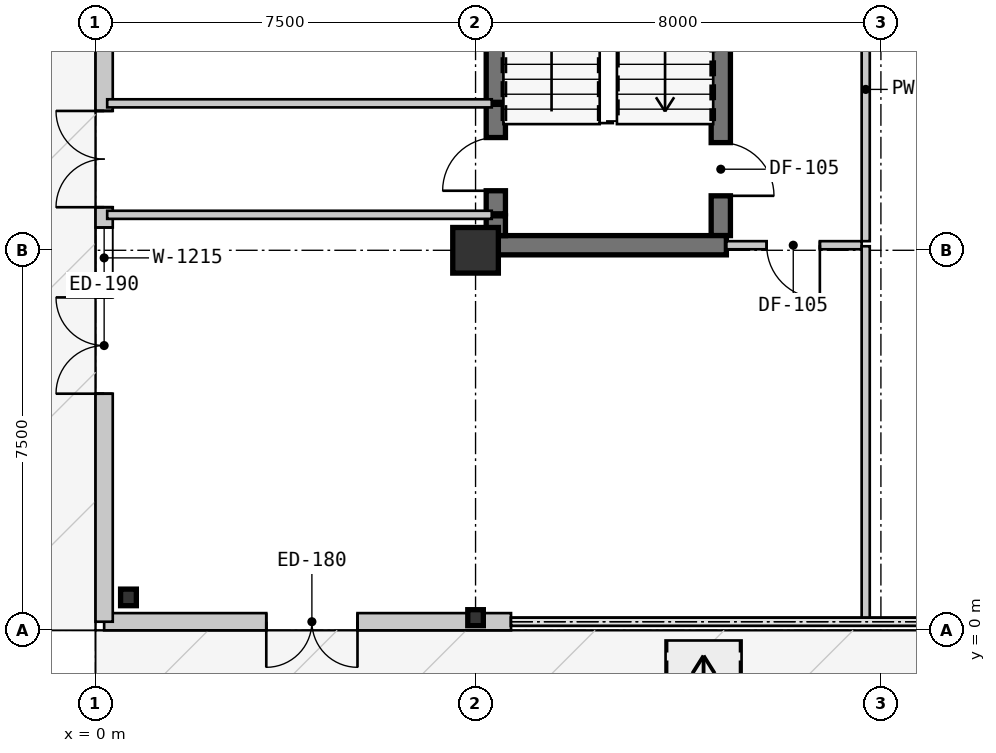
"""IFC4 building model, lengths in metres.
Left out: names, types, materials, properties, quantities, classifications, styles, units other than length and angle.
Written with IfcOpenShell. Run it as: python <this file> out.ifc"""

import sys

from ifc_helpers import new_model, si_unit, direction, frame, frame_2d, origin, origin_2d, place, context, subcontext, project, spatial, rectangle, circle, i_section, extrude, source, transform, mapped, element, fill, save


model = new_model("IFC4")
c1 = context("Model", 3, precision=1e-05, world=origin(), true_north=direction((0.0, 1.0)))
c2 = subcontext(c1, "Body", "Model", "MODEL_VIEW")
j1 = project(units=[si_unit("LENGTHUNIT", "METRE"), si_unit("PLANEANGLEUNIT", "RADIAN")], contexts=[c1])
p1 = place(None, origin())
s1 = spatial("IfcSite", under=j1, at=p1, CompositionType="ELEMENT")
p2 = place(p1, origin())
s2 = spatial("IfcBuilding", under=s1, at=p2, CompositionType="ELEMENT")
p3 = place(p2, origin())
s3 = spatial("IfcBuildingStorey", under=s2, at=p3, CompositionType="ELEMENT", Elevation=0.0)
m1 = source(origin(), c2, "Body", "SweptSolid", [
    extrude(circle(Radius=0.45, at=origin_2d()), origin(), (0.0, 0.0, 1.0), 4.55),
])
p4 = place(p3, frame((7.5, 7.5, 0.0), z_axis=(0.0, 0.0, 1.0), x_axis=(1.0, 0.0, 0.0)))
e1 = element("IfcColumn", 1, at=p4, inside=s3, PredefinedType="COLUMN", context=c2, shape_type="MappedRepresentation", body=[
    mapped(m1, transform((0.0, 0.0, 0.0), scale=1.0)),
])
m2 = source(origin(), c2, "Body", "SweptSolid", [
    extrude(i_section(OverallWidth=0.311, OverallDepth=0.327, WebThickness=0.016, FlangeThickness=0.025, at=origin_2d()), origin(), (0.0, 0.0, 1.0), 4.55),
])
p5 = place(p3, frame((0.65, 0.65, 0.0), z_axis=(0.0, 0.0, 1.0), x_axis=(1.0, 0.0, 0.0)))
e2 = element("IfcColumn", 2, at=p5, inside=s3, PredefinedType="COLUMN", context=c2, shape_type="MappedRepresentation", body=[
    mapped(m2, transform((0.0, 0.0, 0.0), scale=1.0)),
])
m3 = source(origin(), c2, "Body", "SweptSolid", [
    extrude(i_section(OverallWidth=0.307, OverallDepth=0.315, WebThickness=0.012, FlangeThickness=0.019, at=origin_2d()), origin(), (0.0, 0.0, 1.0), 4.55),
])
p6 = place(p3, frame((7.5, 0.25, 0.0), z_axis=(0.0, 0.0, 1.0), x_axis=(1.0, 0.0, 0.0)))
e3 = element("IfcColumn", 3, at=p6, inside=s3, PredefinedType="PILASTER", context=c2, shape_type="MappedRepresentation", body=[
    mapped(m3, transform((0.0, 0.0, 0.0), scale=1.0)),
])
m4 = source(origin(), c2, "Body", "SweptSolid", [
    extrude(rectangle(XDim=8.03, YDim=0.34, at=frame_2d((4.015, 0.0))), origin(), (0.0, 0.0, 1.0), 4.29),
])
p7 = place(p3, frame((0.17, 0.17, 0.0), z_axis=(0.0, 0.0, 1.0), x_axis=(1.0, 0.0, 0.0)))
e4 = element("IfcWall", 4, at=p7, inside=s3, PredefinedType="SOLIDWALL", context=c2, shape_type="MappedRepresentation", body=[
    mapped(m4, transform((0.0, 0.0, 0.0), scale=1.0)),
])
m5 = source(origin(), c2, "Body", "SweptSolid", [
    extrude(rectangle(XDim=1.8, YDim=2.3, at=frame_2d((0.9, 1.15))), frame((0.0, 0.18, 0.0), z_axis=(0.0, -1.0, 0.0), x_axis=(1.0, 0.0, 0.0)), (0.0, 0.0, 1.0), 0.36),
])
p8 = place(p7, frame((3.2, 0.0, 0.0)))
e5 = element("IfcOpeningElement", 5, at=p8, cuts=e4, PredefinedType="OPENING", context=c2, shape_type="MappedRepresentation", body=[
    mapped(m5, transform((0.0, 0.0, 0.0), scale=1.0)),
])
m6 = source(origin(), c2, "Body", "SweptSolid", [
    extrude(rectangle(XDim=39.66, YDim=0.34, at=frame_2d((19.83, 0.0))), origin(), (0.0, 0.0, 1.0), 4.29),
])
p9 = place(p3, frame((0.17, 0.17, 0.0), z_axis=(0.0, 0.0, 1.0), x_axis=(0.0, 1.0, 0.0)))
e6 = element("IfcWall", 6, at=p9, inside=s3, PredefinedType="SOLIDWALL", context=c2, shape_type="MappedRepresentation", body=[
    mapped(m6, transform((0.0, 0.0, 0.0), scale=1.0)),
])
m7 = source(origin(), c2, "Body", "SweptSolid", [
    extrude(rectangle(XDim=1.9, YDim=2.4, at=frame_2d((0.95, 1.2))), frame((0.0, 0.18, 0.0), z_axis=(0.0, -1.0, 0.0), x_axis=(1.0, 0.0, 0.0)), (0.0, 0.0, 1.0), 0.36),
])
p10 = place(p9, frame((4.5, 0.0, 0.0)))
e7 = element("IfcOpeningElement", 7, at=p10, cuts=e6, PredefinedType="OPENING", context=c2, shape_type="MappedRepresentation", body=[
    mapped(m7, transform((0.0, 0.0, 0.0), scale=1.0)),
])
p11 = place(p9, frame((17.5, 0.0, 0.0)))
e8 = element("IfcOpeningElement", 8, at=p11, cuts=e6, PredefinedType="OPENING", context=c2, shape_type="MappedRepresentation", body=[
    mapped(m7, transform((0.0, 0.0, 0.0), scale=1.0)),
])
p12 = place(p9, frame((28.0, 0.0, 0.0)))
e9 = element("IfcOpeningElement", 9, at=p12, cuts=e6, PredefinedType="OPENING", context=c2, shape_type="MappedRepresentation", body=[
    mapped(m7, transform((0.0, 0.0, 0.0), scale=1.0)),
])
p13 = place(p9, frame((8.18, 0.0, 0.0)))
e10 = element("IfcOpeningElement", 10, at=p13, cuts=e6, PredefinedType="OPENING", context=c2, shape_type="MappedRepresentation", body=[
    mapped(m7, transform((0.0, 0.0, 0.0), scale=1.0)),
])
m8 = source(origin(), c2, "Body", "SweptSolid", [
    extrude(rectangle(XDim=1.2, YDim=1.5, at=frame_2d((0.6, 0.75))), frame((0.0, 0.18, 0.0), z_axis=(0.0, -1.0, 0.0), x_axis=(1.0, 0.0, 0.0)), (0.0, 0.0, 1.0), 0.36),
])
p14 = place(p9, frame((6.58, 0.0, 0.95)))
e11 = element("IfcOpeningElement", 11, at=p14, cuts=e6, PredefinedType="OPENING", context=c2, shape_type="MappedRepresentation", body=[
    mapped(m8, transform((0.0, 0.0, 0.0), scale=1.0)),
])
m9 = source(origin(), c2, "Body", "SweptSolid", [
    extrude(rectangle(XDim=2.1, YDim=1.6, at=frame_2d((1.05, 0.8))), frame((0.0, 0.18, 0.0), z_axis=(0.0, -1.0, 0.0), x_axis=(1.0, 0.0, 0.0)), (0.0, 0.0, 1.0), 0.36),
])
p15 = place(p9, frame((34.0, 0.0, 0.95)))
e12 = element("IfcOpeningElement", 12, at=p15, cuts=e6, PredefinedType="OPENING", context=c2, shape_type="MappedRepresentation", body=[
    mapped(m9, transform((0.0, 0.0, 0.0), scale=1.0)),
])
m10 = source(origin(), c2, "Body", "SweptSolid", [
    extrude(rectangle(XDim=8.22, YDim=0.38, at=frame_2d((4.11, 0.0))), origin(), (0.0, 0.0, 1.0), 4.29),
])
p16 = place(p3, frame((12.34, 16.01, 0.0), z_axis=(0.0, 0.0, 1.0), x_axis=(0.0, -1.0, 0.0)))
e13 = element("IfcWall", 13, at=p16, inside=s3, PredefinedType="SHEAR", context=c2, shape_type="MappedRepresentation", body=[
    mapped(m10, transform((0.0, 0.0, 0.0), scale=1.0)),
])
m11 = source(origin(), c2, "Body", "SweptSolid", [
    extrude(rectangle(XDim=1.05, YDim=2.1, at=frame_2d((0.525, 1.05))), frame((0.0, 0.2, 0.0), z_axis=(0.0, -1.0, 0.0), x_axis=(1.0, 0.0, 0.0)), (0.0, 0.0, 1.0), 0.4),
])
p17 = place(p16, frame((6.385, 0.0, 0.0)))
e14 = element("IfcOpeningElement", 14, at=p17, cuts=e13, PredefinedType="OPENING", context=c2, shape_type="MappedRepresentation", body=[
    mapped(m11, transform((0.0, 0.0, 0.0), scale=1.0)),
])
m12 = source(origin(), c2, "Body", "SweptSolid", [
    extrude(rectangle(XDim=4.66, YDim=0.38, at=frame_2d((2.33, 0.0))), origin(), (0.0, 0.0, 1.0), 4.29),
])
p18 = place(p3, frame((12.45, 7.6, 0.0), z_axis=(0.0, 0.0, 1.0), x_axis=(-1.0, 0.0, 0.0)))
e15 = element("IfcWall", 15, at=p18, inside=s3, PredefinedType="SHEAR", context=c2, shape_type="MappedRepresentation", body=[
    mapped(m12, transform((0.0, 0.0, 0.0), scale=1.0)),
])
m13 = source(origin(), c2, "Body", "SweptSolid", [
    extrude(rectangle(XDim=0.39, YDim=0.38, at=frame_2d((0.195, 0.0))), origin(), (0.0, 0.0, 1.0), 4.29),
])
p19 = place(p3, frame((7.9, 7.79, 0.0), z_axis=(0.0, 0.0, 1.0), x_axis=(0.0, 1.0, 0.0)))
e16 = element("IfcWall", 16, at=p19, inside=s3, PredefinedType="SHEAR", context=c2, shape_type="MappedRepresentation", body=[
    mapped(m13, transform((0.0, 0.0, 0.0), scale=1.0)),
])
m14 = source(origin(), c2, "Body", "SweptSolid", [
    extrude(rectangle(XDim=5.59, YDim=0.38, at=frame_2d((2.795, 0.0))), origin(), (0.0, 0.0, 1.0), 4.29),
])
p20 = place(p3, frame((7.9, 10.42, 0.0), z_axis=(0.0, 0.0, 1.0), x_axis=(0.0, 1.0, 0.0)))
e17 = element("IfcWall", 17, at=p20, inside=s3, PredefinedType="SHEAR", context=c2, shape_type="MappedRepresentation", body=[
    mapped(m14, transform((0.0, 0.0, 0.0), scale=1.0)),
])
m15 = source(origin(), c2, "Body", "SweptSolid", [
    extrude(rectangle(XDim=2.16, YDim=0.38, at=frame_2d((1.08, 0.0))), origin(), (0.0, 0.0, 1.0), 4.29),
])
p21 = place(p3, frame((7.9, 8.22, 0.0), z_axis=(0.0, 0.0, 1.0), x_axis=(0.0, 1.0, 0.0)))
e18 = element("IfcWall", 18, at=p21, inside=s3, PredefinedType="SHEAR", context=c2, shape_type="MappedRepresentation", body=[
    mapped(m15, transform((0.0, 0.0, 0.0), scale=1.0)),
])
p22 = place(p21, frame((0.455, 0.0, 0.0)))
e19 = element("IfcOpeningElement", 19, at=p22, cuts=e18, PredefinedType="OPENING", context=c2, shape_type="MappedRepresentation", body=[
    mapped(m11, transform((0.0, 0.0, 0.0), scale=1.0)),
])
m16 = source(origin(), c2, "Body", "SweptSolid", [
    extrude(rectangle(XDim=13.44, YDim=0.16, at=frame_2d((6.72, 0.0))), origin(), (0.0, 0.0, 1.0), 4.29),
])
p23 = place(p3, frame((15.2, 21.12, 0.0), z_axis=(0.0, 0.0, 1.0), x_axis=(0.0, -1.0, 0.0)))
e20 = element("IfcWall", 20, at=p23, inside=s3, PredefinedType="PARTITIONING", context=c2, shape_type="MappedRepresentation", body=[
    mapped(m16, transform((0.0, 0.0, 0.0), scale=1.0)),
])
m17 = source(origin(), c2, "Body", "SweptSolid", [
    extrude(rectangle(XDim=0.92, YDim=2.1, at=frame_2d((0.46, 1.05))), frame((0.0, 0.09, 0.0), z_axis=(0.0, -1.0, 0.0), x_axis=(1.0, 0.0, 0.0)), (0.0, 0.0, 1.0), 0.18),
])
p24 = place(p23, frame((6.23, 0.0, 0.0)))
e21 = element("IfcOpeningElement", 21, at=p24, cuts=e20, PredefinedType="OPENING", context=c2, shape_type="MappedRepresentation", body=[
    mapped(m17, transform((0.0, 0.0, 0.0), scale=1.0)),
])
m18 = source(origin(), c2, "Body", "SweptSolid", [
    extrude(rectangle(XDim=2.67, YDim=0.16, at=frame_2d((1.335, 0.0))), origin(), (0.0, 0.0, 1.0), 4.29),
])
p25 = place(p3, frame((15.12, 7.6, 0.0), z_axis=(0.0, 0.0, 1.0), x_axis=(-1.0, 0.0, 0.0)))
e22 = element("IfcWall", 22, at=p25, inside=s3, PredefinedType="PARTITIONING", context=c2, shape_type="MappedRepresentation", body=[
    mapped(m18, transform((0.0, 0.0, 0.0), scale=1.0)),
])
m19 = source(origin(), c2, "Body", "SweptSolid", [
    extrude(rectangle(XDim=1.05, YDim=2.1, at=frame_2d((0.525, 1.05))), frame((0.0, 0.09, 0.0), z_axis=(0.0, -1.0, 0.0), x_axis=(1.0, 0.0, 0.0)), (0.0, 0.0, 1.0), 0.18),
])
p26 = place(p25, frame((0.825, 0.0, 0.0)))
e23 = element("IfcOpeningElement", 23, at=p26, cuts=e22, PredefinedType="OPENING", context=c2, shape_type="MappedRepresentation", body=[
    mapped(m19, transform((0.0, 0.0, 0.0), scale=1.0)),
])
m20 = source(origin(), c2, "Body", "SweptSolid", [
    extrude(rectangle(XDim=7.35, YDim=0.16, at=frame_2d((3.675, 0.0))), origin(), (0.0, 0.0, 1.0), 4.29),
])
p27 = place(p3, frame((15.2, 0.23, 0.0), z_axis=(0.0, 0.0, 1.0), x_axis=(0.0, 1.0, 0.0)))
e24 = element("IfcWall", 24, at=p27, inside=s3, PredefinedType="PARTITIONING", context=c2, shape_type="MappedRepresentation", body=[
    mapped(m20, transform((0.0, 0.0, 0.0), scale=1.0)),
])
m21 = source(origin(), c2, "Body", "SweptSolid", [
    extrude(rectangle(XDim=7.59, YDim=0.16, at=frame_2d((3.795, 0.0))), origin(), (0.0, 0.0, 1.0), 4.29),
])
for number, where, z_axis, x_axis in (
    (25, (0.23, 8.2, 0.0), (0.0, 0.0, 1.0), (1.0, 0.0, 0.0)),
    (26, (7.82, 10.4, 0.0), (0.0, 0.0, 1.0), (-1.0, 0.0, 0.0)),
):
    element("IfcWall", number, at=place(p3, frame(where, z_axis=z_axis, x_axis=x_axis)), inside=s3, PredefinedType="PARTITIONING", context=c2, shape_type="MappedRepresentation", body=[
        mapped(m21, transform((0.0, 0.0, 0.0), scale=1.0)),
    ])
m22 = source(origin(), c2, "Body", "SweptSolid", [
    extrude(rectangle(XDim=1.8, YDim=2.3, at=frame_2d((0.9, 1.15))), frame((0.0, 0.025, 0.0), z_axis=(0.0, -1.0, 0.0), x_axis=(1.0, 0.0, 0.0)), (0.0, 0.0, 1.0), 0.05),
])
p28 = place(p8, frame((1.8, 0.0, 0.0), z_axis=(0.0, 0.0, 1.0), x_axis=(-1.0, 0.0, 0.0)))
e27 = element("IfcDoor", 27, at=p28, inside=s3, OperationType="DOUBLE_DOOR_SINGLE_SWING", PredefinedType="DOOR", context=c2, shape_type="MappedRepresentation", body=[
    mapped(m22, transform((0.0, 0.0, 0.0), scale=1.0)),
])
fill(e5, e27)
m23 = source(origin(), c2, "Body", "SweptSolid", [
    extrude(rectangle(XDim=1.9, YDim=2.4, at=frame_2d((0.95, 1.2))), frame((0.0, 0.025, 0.0), z_axis=(0.0, -1.0, 0.0), x_axis=(1.0, 0.0, 0.0)), (0.0, 0.0, 1.0), 0.05),
])
p29 = place(p10, origin())
e28 = element("IfcDoor", 28, at=p29, inside=s3, OperationType="DOUBLE_DOOR_SINGLE_SWING", PredefinedType="DOOR", context=c2, shape_type="MappedRepresentation", body=[
    mapped(m23, transform((0.0, 0.0, 0.0), scale=1.0)),
])
fill(e7, e28)
p30 = place(p13, origin())
e29 = element("IfcDoor", 29, at=p30, inside=s3, OperationType="DOUBLE_DOOR_SINGLE_SWING", PredefinedType="DOOR", context=c2, shape_type="MappedRepresentation", body=[
    mapped(m23, transform((0.0, 0.0, 0.0), scale=1.0)),
])
fill(e10, e29)
m24 = source(origin(), c2, "Body", "SweptSolid", [
    extrude(rectangle(XDim=1.2, YDim=1.5, at=frame_2d((0.6, 0.75))), frame((0.0, 0.03, 0.0), z_axis=(0.0, -1.0, 0.0), x_axis=(1.0, 0.0, 0.0)), (0.0, 0.0, 1.0), 0.06),
])
p31 = place(p14, origin())
e30 = element("IfcWindow", 30, at=p31, inside=s3, PartitioningType="SINGLE_PANEL", PredefinedType="WINDOW", context=c2, shape_type="MappedRepresentation", body=[
    mapped(m24, transform((0.0, 0.0, 0.0), scale=1.0)),
])
fill(e11, e30)
m25 = source(origin(), c2, "Body", "SweptSolid", [
    extrude(rectangle(XDim=1.05, YDim=2.1, at=frame_2d((0.525, 1.05))), frame((0.0, 0.025, 0.0), z_axis=(0.0, -1.0, 0.0), x_axis=(1.0, 0.0, 0.0)), (0.0, 0.0, 1.0), 0.05),
])
p32 = place(p17, origin())
e31 = element("IfcDoor", 31, at=p32, inside=s3, OperationType="SINGLE_SWING_RIGHT", PredefinedType="DOOR", context=c2, shape_type="MappedRepresentation", body=[
    mapped(m25, transform((0.0, 0.0, 0.0), scale=1.0)),
])
fill(e14, e31)
p33 = place(p26, origin())
e32 = element("IfcDoor", 32, at=p33, inside=s3, OperationType="SINGLE_SWING_LEFT", PredefinedType="DOOR", context=c2, shape_type="MappedRepresentation", body=[
    mapped(m25, transform((0.0, 0.0, 0.0), scale=1.0)),
])
fill(e23, e32)
p34 = place(p22, origin())
e33 = element("IfcDoor", 33, at=p34, inside=s3, OperationType="SINGLE_SWING_LEFT", PredefinedType="DOOR", context=c2, shape_type="MappedRepresentation", body=[
    mapped(m25, transform((0.0, 0.0, 0.0), scale=1.0)),
])
fill(e19, e33)
save(model, sys.argv[1])
